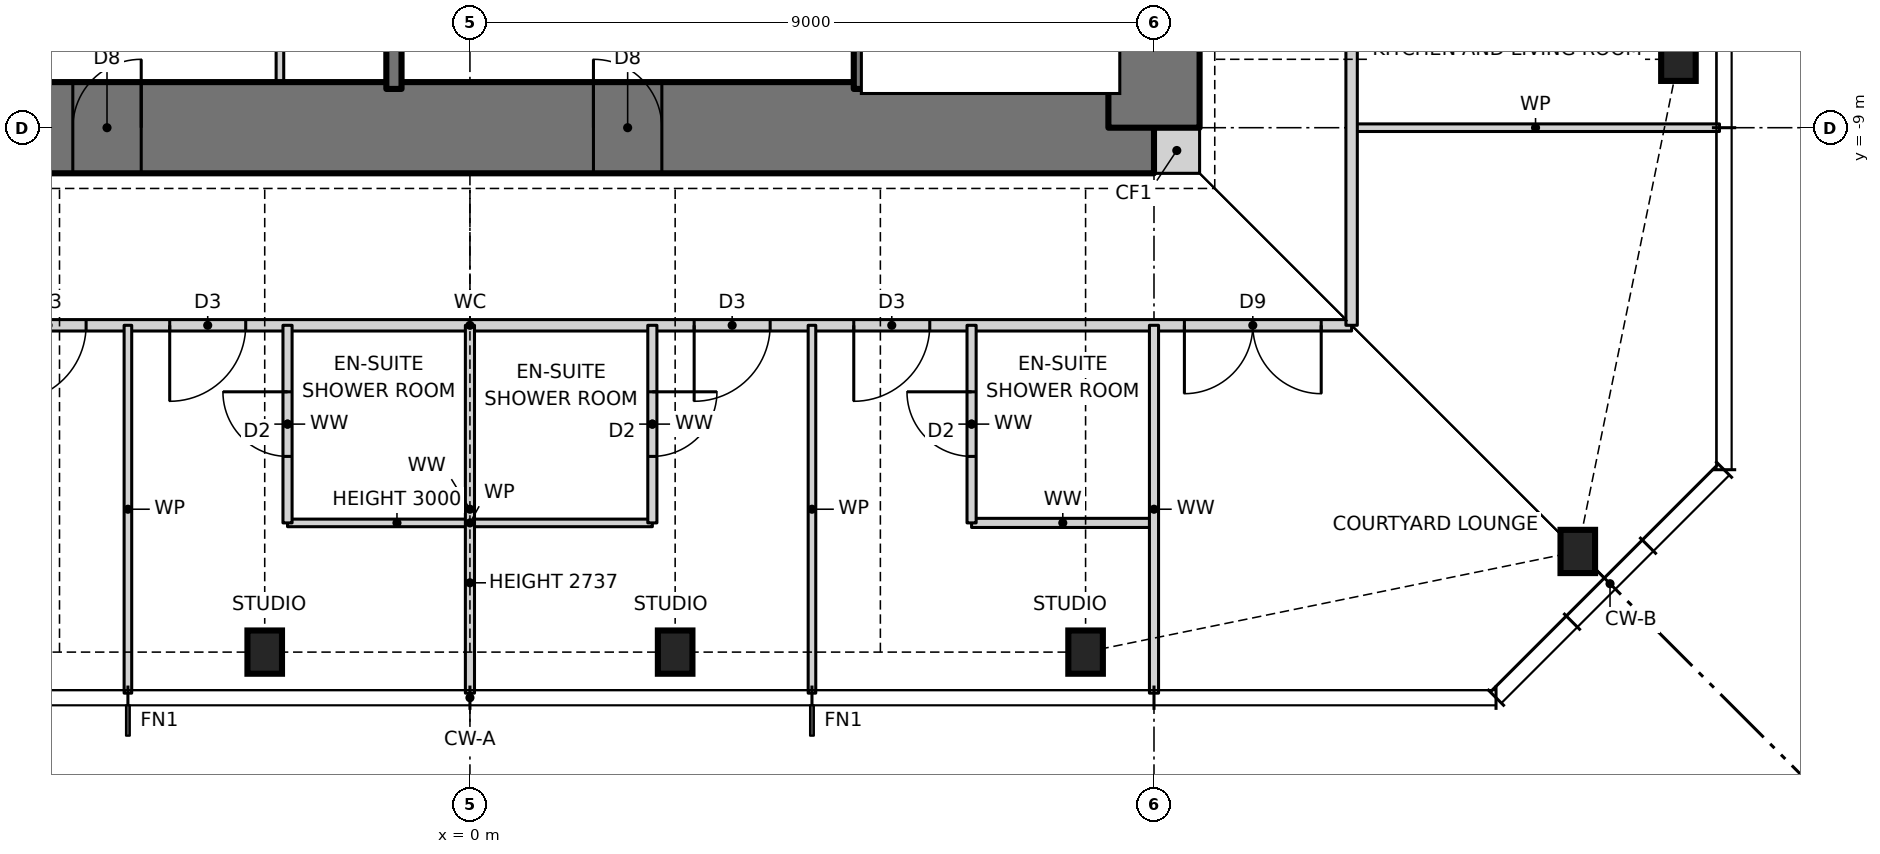
"""IFC4 building model, lengths in metres.
Left out: names, types, materials, properties, quantities, classifications, styles, units other than length and angle.
Written with IfcOpenShell. Run it as: python <this file> out.ifc"""

import sys

from ifc_helpers import new_model, si_unit, direction, frame, frame_2d, origin, origin_2d, place, context, subcontext, project, spatial, rectangle, i_section, extrude, element, fill, save


model = new_model("IFC4")
c1 = context("Model", 3, precision=1e-05, world=origin(), true_north=direction((0.0, 1.0)))
c2 = subcontext(c1, "Body", "Model", "MODEL_VIEW")
j1 = project(units=[si_unit("LENGTHUNIT", "METRE"), si_unit("PLANEANGLEUNIT", "RADIAN")], contexts=[c1])
p1 = place(None, origin())
s1 = spatial("IfcSite", under=j1, at=p1, CompositionType="ELEMENT")
p2 = place(p1, origin())
s2 = spatial("IfcBuilding", under=s1, at=p2, CompositionType="ELEMENT")
p3 = place(p2, frame((0.0, 0.0, 222.0)))
s3 = spatial("IfcBuildingStorey", under=s2, at=p3, CompositionType="ELEMENT", Elevation=222.0)
for number, where, z_axis, x_axis in (
    (1, (-2.7, -15.9, 0.0), (0.0, 0.0, 1.0), (1.0, 0.0, 0.0)),
    (2, (2.7, -15.9, 0.0), (0.0, 0.0, 1.0), (1.0, 0.0, 0.0)),
    (3, (8.1, -15.9, 0.0), (0.0, 0.0, 1.0), (1.0, 0.0, 0.0)),
    (4, (14.576, -14.576, 0.0), (0.0, 0.0, 1.0), (1.0, 0.0, 0.0)),
    (5, (15.9, -8.1, 0.0), (0.0, 0.0, 1.0), (1.0, 0.0, 0.0)),
):
    element("IfcColumn", number, at=place(p3, frame(where, z_axis=z_axis, x_axis=x_axis)), inside=s3, PredefinedType="COLUMN", context=c2, shape_type="SweptSolid", body=[
        extrude(i_section(OverallWidth=0.455, OverallDepth=0.569, WebThickness=0.078, FlangeThickness=0.125, at=origin_2d()), origin(), (0.0, 0.0, 1.0), 3.5),
    ])
p4 = place(p3, frame((9.0, -9.3, 0.0), z_axis=(0.0, 0.0, 1.0), x_axis=(1.0, 0.0, 0.0)))
e6 = element("IfcWall", 6, at=p4, inside=s3, PredefinedType="SOLIDWALL", context=c2, shape_type="SweptSolid", body=[
    extrude(rectangle(XDim=0.6, YDim=0.6, at=frame_2d((0.3, 0.0))), origin(), (0.0, 0.0, 1.0), 3.5),
])
p5 = place(p3, frame((-9.0, -9.0, 0.0), z_axis=(0.0, 0.0, 1.0), x_axis=(1.0, 0.0, 0.0)))
e7 = element("IfcWall", 7, at=p5, inside=s3, PredefinedType="SHEAR", context=c2, shape_type="SweptSolid", body=[
    extrude(rectangle(XDim=18.0, YDim=1.2, at=frame_2d((9.0, 0.0))), origin(), (0.0, 0.0, 1.0), 3.5),
])
p6 = place(p5, frame((3.775, 0.0, 0.0)))
e8 = element("IfcOpeningElement", 8, at=p6, cuts=e7, PredefinedType="OPENING", context=c2, shape_type="SweptSolid", body=[
    extrude(rectangle(XDim=0.9, YDim=2.1, at=frame_2d((0.45, 1.05))), frame((0.0, 0.61, 0.0), z_axis=(0.0, -1.0, 0.0), x_axis=(1.0, 0.0, 0.0)), (0.0, 0.0, 1.0), 1.22),
])
p7 = place(p5, frame((10.625, 0.0, 0.0)))
e9 = element("IfcOpeningElement", 9, at=p7, cuts=e7, PredefinedType="OPENING", context=c2, shape_type="SweptSolid", body=[
    extrude(rectangle(XDim=0.9, YDim=2.1, at=frame_2d((0.45, 1.05))), frame((0.0, 0.61, 0.0), z_axis=(0.0, -1.0, 0.0), x_axis=(1.0, 0.0, 0.0)), (0.0, 0.0, 1.0), 1.22),
])
p8 = place(p3, frame((9.0, -9.0, 0.0), z_axis=(0.0, 0.0, 1.0), x_axis=(0.0, 1.0, 0.0)))
e10 = element("IfcWall", 10, at=p8, inside=s3, PredefinedType="SHEAR", context=c2, shape_type="SweptSolid", body=[
    extrude(rectangle(XDim=18.0, YDim=1.2, at=frame_2d((9.0, 0.0))), origin(), (0.0, 0.0, 1.0), 3.5),
])
p9 = place(p8, frame((8.5, 0.0, 0.0)))
e11 = element("IfcOpeningElement", 11, at=p9, cuts=e10, PredefinedType="OPENING", context=c2, shape_type="SweptSolid", body=[
    extrude(rectangle(XDim=1.0, YDim=2.1, at=frame_2d((0.5, 1.05))), frame((0.0, 0.61, 0.0), z_axis=(0.0, -1.0, 0.0), x_axis=(1.0, 0.0, 0.0)), (0.0, 0.0, 1.0), 1.22),
])
p10 = place(p3, frame((-2.4, -14.2, 0.0), z_axis=(0.0, 0.0, 1.0), x_axis=(1.0, 0.0, 0.0)))
e12 = element("IfcWall", 12, at=p10, inside=s3, PredefinedType="PARTITIONING", context=c2, shape_type="SweptSolid", body=[
    extrude(rectangle(XDim=4.8, YDim=0.1, at=frame_2d((2.4, 0.0))), origin(), (0.0, 0.0, 1.0), 3.0),
])
p11 = place(p3, frame((6.6, -14.2, 0.0), z_axis=(0.0, 0.0, 1.0), x_axis=(1.0, 0.0, 0.0)))
e13 = element("IfcWall", 13, at=p11, inside=s3, PredefinedType="PARTITIONING", context=c2, shape_type="SweptSolid", body=[
    extrude(rectangle(XDim=2.4, YDim=0.12, at=frame_2d((1.2, 0.0))), origin(), (0.0, 0.0, 1.0), 3.27),
])
p12 = place(p3, frame((-11.6, -11.6, 0.0), z_axis=(0.0, 0.0, 1.0), x_axis=(1.0, 0.0, 0.0)))
e14 = element("IfcWall", 14, at=p12, inside=s3, PredefinedType="PARTITIONING", context=c2, shape_type="SweptSolid", body=[
    extrude(rectangle(XDim=23.2, YDim=0.15, at=frame_2d((11.6, 0.0))), origin(), (0.0, 0.0, 1.0), 3.27),
])
p13 = place(p12, frame((5.55, 0.0, 0.0)))
e15 = element("IfcOpeningElement", 15, at=p13, cuts=e14, PredefinedType="OPENING", context=c2, shape_type="SweptSolid", body=[
    extrude(rectangle(XDim=1.0, YDim=2.1, at=frame_2d((0.5, 1.05))), frame((0.0, 0.085, 0.0), z_axis=(0.0, -1.0, 0.0), x_axis=(1.0, 0.0, 0.0)), (0.0, 0.0, 1.0), 0.17),
])
p14 = place(p12, frame((7.65, 0.0, 0.0)))
e16 = element("IfcOpeningElement", 16, at=p14, cuts=e14, PredefinedType="OPENING", context=c2, shape_type="SweptSolid", body=[
    extrude(rectangle(XDim=1.0, YDim=2.1, at=frame_2d((0.5, 1.05))), frame((0.0, 0.085, 0.0), z_axis=(0.0, -1.0, 0.0), x_axis=(1.0, 0.0, 0.0)), (0.0, 0.0, 1.0), 0.17),
])
p15 = place(p12, frame((14.55, 0.0, 0.0)))
e17 = element("IfcOpeningElement", 17, at=p15, cuts=e14, PredefinedType="OPENING", context=c2, shape_type="SweptSolid", body=[
    extrude(rectangle(XDim=1.0, YDim=2.1, at=frame_2d((0.5, 1.05))), frame((0.0, 0.085, 0.0), z_axis=(0.0, -1.0, 0.0), x_axis=(1.0, 0.0, 0.0)), (0.0, 0.0, 1.0), 0.17),
])
p16 = place(p12, frame((16.65, 0.0, 0.0)))
e18 = element("IfcOpeningElement", 18, at=p16, cuts=e14, PredefinedType="OPENING", context=c2, shape_type="SweptSolid", body=[
    extrude(rectangle(XDim=1.0, YDim=2.1, at=frame_2d((0.5, 1.05))), frame((0.0, 0.085, 0.0), z_axis=(0.0, -1.0, 0.0), x_axis=(1.0, 0.0, 0.0)), (0.0, 0.0, 1.0), 0.17),
])
p17 = place(p12, frame((21.0, 0.0, 0.0)))
e19 = element("IfcOpeningElement", 19, at=p17, cuts=e14, PredefinedType="OPENING", context=c2, shape_type="SweptSolid", body=[
    extrude(rectangle(XDim=1.8, YDim=2.1, at=frame_2d((0.9, 1.05))), frame((0.0, 0.085, 0.0), z_axis=(0.0, -1.0, 0.0), x_axis=(1.0, 0.0, 0.0)), (0.0, 0.0, 1.0), 0.17),
])
p18 = place(p3, frame((11.6, -9.0, 0.0), z_axis=(0.0, 0.0, 1.0), x_axis=(1.0, 0.0, 0.0)))
e20 = element("IfcWall", 20, at=p18, inside=s3, PredefinedType="PARTITIONING", context=c2, shape_type="SweptSolid", body=[
    extrude(rectangle(XDim=4.84, YDim=0.1, at=frame_2d((2.42, 0.0))), origin(), (0.0, 0.0, 1.0), 3.27),
])
p19 = place(p3, frame((11.6, -11.6, 0.0), z_axis=(0.0, 0.0, 1.0), x_axis=(0.0, 1.0, 0.0)))
e21 = element("IfcWall", 21, at=p19, inside=s3, PredefinedType="PARTITIONING", context=c2, shape_type="SweptSolid", body=[
    extrude(rectangle(XDim=23.2, YDim=0.15, at=frame_2d((11.6, 0.0))), origin(), (0.0, 0.0, 1.0), 3.27),
])
p20 = place(p19, frame((5.7, 0.0, 0.0)))
e22 = element("IfcOpeningElement", 22, at=p20, cuts=e21, PredefinedType="OPENING", context=c2, shape_type="SweptSolid", body=[
    extrude(rectangle(XDim=1.0, YDim=2.1, at=frame_2d((0.5, 1.05))), frame((0.0, 0.085, 0.0), z_axis=(0.0, -1.0, 0.0), x_axis=(1.0, 0.0, 0.0)), (0.0, 0.0, 1.0), 0.17),
])
p21 = place(p19, frame((12.15, 0.0, 0.0)))
e23 = element("IfcOpeningElement", 23, at=p21, cuts=e21, PredefinedType="OPENING", context=c2, shape_type="SweptSolid", body=[
    extrude(rectangle(XDim=1.0, YDim=2.1, at=frame_2d((0.5, 1.05))), frame((0.0, 0.085, 0.0), z_axis=(0.0, -1.0, 0.0), x_axis=(1.0, 0.0, 0.0)), (0.0, 0.0, 1.0), 0.17),
])
p22 = place(p19, frame((19.05, 0.0, 0.0)))
e24 = element("IfcOpeningElement", 24, at=p22, cuts=e21, PredefinedType="OPENING", context=c2, shape_type="SweptSolid", body=[
    extrude(rectangle(XDim=1.0, YDim=2.1, at=frame_2d((0.5, 1.05))), frame((0.0, 0.085, 0.0), z_axis=(0.0, -1.0, 0.0), x_axis=(1.0, 0.0, 0.0)), (0.0, 0.0, 1.0), 0.17),
])
p23 = place(p19, frame((21.0, 0.0, 0.0)))
e25 = element("IfcOpeningElement", 25, at=p23, cuts=e21, PredefinedType="OPENING", context=c2, shape_type="SweptSolid", body=[
    extrude(rectangle(XDim=1.8, YDim=2.1, at=frame_2d((0.9, 1.05))), frame((0.0, 0.085, 0.0), z_axis=(0.0, -1.0, 0.0), x_axis=(1.0, 0.0, 0.0)), (0.0, 0.0, 1.0), 0.17),
])
p24 = place(p3, frame((9.0, -16.44, 0.0), z_axis=(0.0, 0.0, 1.0), x_axis=(0.0, 1.0, 0.0)))
e26 = element("IfcWall", 26, at=p24, inside=s3, PredefinedType="PARTITIONING", context=c2, shape_type="SweptSolid", body=[
    extrude(rectangle(XDim=4.84, YDim=0.12, at=frame_2d((2.42, 0.0))), origin(), (0.0, 0.0, 1.0), 3.27),
])
p25 = place(p3, frame((6.6, -14.2, 0.0), z_axis=(0.0, 0.0, 1.0), x_axis=(0.0, 1.0, 0.0)))
e27 = element("IfcWall", 27, at=p25, inside=s3, PredefinedType="PARTITIONING", context=c2, shape_type="SweptSolid", body=[
    extrude(rectangle(XDim=2.6, YDim=0.12, at=frame_2d((1.3, 0.0))), origin(), (0.0, 0.0, 1.0), 3.27),
])
p26 = place(p25, frame((0.875, 0.0, 0.0)))
e28 = element("IfcOpeningElement", 28, at=p26, cuts=e27, PredefinedType="OPENING", context=c2, shape_type="SweptSolid", body=[
    extrude(rectangle(XDim=0.85, YDim=2.1, at=frame_2d((0.425, 1.05))), frame((0.0, 0.07, 0.0), z_axis=(0.0, -1.0, 0.0), x_axis=(1.0, 0.0, 0.0)), (0.0, 0.0, 1.0), 0.14),
])
p27 = place(p3, frame((5.15, -8.49, 0.0), z_axis=(0.0, 0.0, 1.0), x_axis=(0.0, 1.0, 0.0)))
e29 = element("IfcWall", 29, at=p27, inside=s3, PredefinedType="SOLIDWALL", context=c2, shape_type="SweptSolid", body=[
    extrude(rectangle(XDim=13.09, YDim=0.2, at=frame_2d((6.545, 0.0))), origin(), (0.0, 0.0, 1.0), 3.5),
])
p28 = place(p27, frame((7.89, 0.0, 0.0)))
e30 = element("IfcOpeningElement", 30, at=p28, cuts=e29, PredefinedType="OPENING", context=c2, shape_type="SweptSolid", body=[
    extrude(rectangle(XDim=1.2, YDim=2.1, at=frame_2d((0.6, 1.05))), frame((0.0, 0.11, 0.0), z_axis=(0.0, -1.0, 0.0), x_axis=(1.0, 0.0, 0.0)), (0.0, 0.0, 1.0), 0.22),
])
p29 = place(p3, frame((4.5, -16.44, 0.0), z_axis=(0.0, 0.0, 1.0), x_axis=(0.0, 1.0, 0.0)))
e31 = element("IfcWall", 31, at=p29, inside=s3, PredefinedType="PARTITIONING", context=c2, shape_type="SweptSolid", body=[
    extrude(rectangle(XDim=4.84, YDim=0.1, at=frame_2d((2.42, 0.0))), origin(), (0.0, 0.0, 1.0), 3.27),
])
p30 = place(p3, frame((2.4, -14.2, 0.0), z_axis=(0.0, 0.0, 1.0), x_axis=(0.0, 1.0, 0.0)))
e32 = element("IfcWall", 32, at=p30, inside=s3, PredefinedType="PARTITIONING", context=c2, shape_type="SweptSolid", body=[
    extrude(rectangle(XDim=2.6, YDim=0.12, at=frame_2d((1.3, 0.0))), origin(), (0.0, 0.0, 1.0), 3.27),
])
p31 = place(p30, frame((0.875, 0.0, 0.0)))
e33 = element("IfcOpeningElement", 33, at=p31, cuts=e32, PredefinedType="OPENING", context=c2, shape_type="SweptSolid", body=[
    extrude(rectangle(XDim=0.85, YDim=2.1, at=frame_2d((0.425, 1.05))), frame((0.0, 0.07, 0.0), z_axis=(0.0, -1.0, 0.0), x_axis=(1.0, 0.0, 0.0)), (0.0, 0.0, 1.0), 0.14),
])
p32 = place(p3, frame((0.0, -16.44, 0.0), z_axis=(0.0, 0.0, 1.0), x_axis=(0.0, 1.0, 0.0)))
e34 = element("IfcWall", 34, at=p32, inside=s3, PredefinedType="PARTITIONING", context=c2, shape_type="SweptSolid", body=[
    extrude(rectangle(XDim=4.84, YDim=0.12, at=frame_2d((2.42, 0.0))), origin(), (0.0, 0.0, 1.0), 2.737),
])
p33 = place(p3, frame((-1.0, -8.49, 0.0), z_axis=(0.0, 0.0, 1.0), x_axis=(0.0, 1.0, 0.0)))
e35 = element("IfcWall", 35, at=p33, inside=s3, PredefinedType="SOLIDWALL", context=c2, shape_type="SweptSolid", body=[
    extrude(rectangle(XDim=4.09, YDim=0.2, at=frame_2d((2.045, 0.0))), origin(), (0.0, 0.0, 1.0), 3.5),
])
p34 = place(p3, frame((-2.4, -14.2, 0.0), z_axis=(0.0, 0.0, 1.0), x_axis=(0.0, 1.0, 0.0)))
e36 = element("IfcWall", 36, at=p34, inside=s3, PredefinedType="PARTITIONING", context=c2, shape_type="SweptSolid", body=[
    extrude(rectangle(XDim=2.6, YDim=0.12, at=frame_2d((1.3, 0.0))), origin(), (0.0, 0.0, 1.0), 3.27),
])
p35 = place(p34, frame((0.875, 0.0, 0.0)))
e37 = element("IfcOpeningElement", 37, at=p35, cuts=e36, PredefinedType="OPENING", context=c2, shape_type="SweptSolid", body=[
    extrude(rectangle(XDim=0.85, YDim=2.1, at=frame_2d((0.425, 1.05))), frame((0.0, 0.07, 0.0), z_axis=(0.0, -1.0, 0.0), x_axis=(1.0, 0.0, 0.0)), (0.0, 0.0, 1.0), 0.14),
])
p36 = place(p3, frame((-2.5, -8.49, 0.0), z_axis=(0.0, 0.0, 1.0), x_axis=(0.0, 1.0, 0.0)))
e38 = element("IfcWall", 38, at=p36, inside=s3, PredefinedType="PARTITIONING", context=c2, shape_type="SweptSolid", body=[
    extrude(rectangle(XDim=4.09, YDim=0.1, at=frame_2d((2.045, 0.0))), origin(), (0.0, 0.0, 1.0), 3.3),
])
p37 = place(p36, frame((1.595, 0.0, 0.0)))
e39 = element("IfcOpeningElement", 39, at=p37, cuts=e38, PredefinedType="OPENING", context=c2, shape_type="SweptSolid", body=[
    extrude(rectangle(XDim=0.9, YDim=2.1, at=frame_2d((0.45, 1.05))), frame((0.0, 0.06, 0.0), z_axis=(0.0, -1.0, 0.0), x_axis=(1.0, 0.0, 0.0)), (0.0, 0.0, 1.0), 0.12),
])
p38 = place(p3, frame((-4.5, -16.44, 0.0), z_axis=(0.0, 0.0, 1.0), x_axis=(0.0, 1.0, 0.0)))
e40 = element("IfcWall", 40, at=p38, inside=s3, PredefinedType="PARTITIONING", context=c2, shape_type="SweptSolid", body=[
    extrude(rectangle(XDim=4.84, YDim=0.1, at=frame_2d((2.42, 0.0))), origin(), (0.0, 0.0, 1.0), 3.27),
])
p39 = place(p13, frame((1.0, 0.0, 0.0), z_axis=(0.0, 0.0, 1.0), x_axis=(-1.0, 0.0, 0.0)))
e41 = element("IfcDoor", 41, at=p39, inside=s3, OperationType="SINGLE_SWING_RIGHT", PredefinedType="DOOR", context=c2, shape_type="SweptSolid", body=[
    extrude(rectangle(XDim=1.0, YDim=2.1, at=frame_2d((0.5, 1.05))), frame((0.0, 0.025, 0.0), z_axis=(0.0, -1.0, 0.0), x_axis=(1.0, 0.0, 0.0)), (0.0, 0.0, 1.0), 0.05),
])
fill(e15, e41)
p40 = place(p14, frame((1.0, 0.0, 0.0), z_axis=(0.0, 0.0, 1.0), x_axis=(-1.0, 0.0, 0.0)))
e42 = element("IfcDoor", 42, at=p40, inside=s3, OperationType="SINGLE_SWING_RIGHT", PredefinedType="DOOR", context=c2, shape_type="SweptSolid", body=[
    extrude(rectangle(XDim=1.0, YDim=2.1, at=frame_2d((0.5, 1.05))), frame((0.0, 0.025, 0.0), z_axis=(0.0, -1.0, 0.0), x_axis=(1.0, 0.0, 0.0)), (0.0, 0.0, 1.0), 0.05),
])
fill(e16, e42)
p41 = place(p35, origin())
e43 = element("IfcDoor", 43, at=p41, inside=s3, OperationType="SINGLE_SWING_RIGHT", PredefinedType="DOOR", context=c2, shape_type="SweptSolid", body=[
    extrude(rectangle(XDim=0.85, YDim=2.1, at=frame_2d((0.425, 1.05))), frame((0.0, 0.025, 0.0), z_axis=(0.0, -1.0, 0.0), x_axis=(1.0, 0.0, 0.0)), (0.0, 0.0, 1.0), 0.05),
])
fill(e37, e43)
p42 = place(p15, frame((1.0, 0.0, 0.0), z_axis=(0.0, 0.0, 1.0), x_axis=(-1.0, 0.0, 0.0)))
e44 = element("IfcDoor", 44, at=p42, inside=s3, OperationType="SINGLE_SWING_RIGHT", PredefinedType="DOOR", context=c2, shape_type="SweptSolid", body=[
    extrude(rectangle(XDim=1.0, YDim=2.1, at=frame_2d((0.5, 1.05))), frame((0.0, 0.025, 0.0), z_axis=(0.0, -1.0, 0.0), x_axis=(1.0, 0.0, 0.0)), (0.0, 0.0, 1.0), 0.05),
])
fill(e17, e44)
p43 = place(p31, frame((0.85, 0.0, 0.0), z_axis=(0.0, 0.0, 1.0), x_axis=(-1.0, 0.0, 0.0)))
e45 = element("IfcDoor", 45, at=p43, inside=s3, OperationType="SINGLE_SWING_LEFT", PredefinedType="DOOR", context=c2, shape_type="SweptSolid", body=[
    extrude(rectangle(XDim=0.85, YDim=2.1, at=frame_2d((0.425, 1.05))), frame((0.0, 0.025, 0.0), z_axis=(0.0, -1.0, 0.0), x_axis=(1.0, 0.0, 0.0)), (0.0, 0.0, 1.0), 0.05),
])
fill(e33, e45)
p44 = place(p16, frame((1.0, 0.0, 0.0), z_axis=(0.0, 0.0, 1.0), x_axis=(-1.0, 0.0, 0.0)))
e46 = element("IfcDoor", 46, at=p44, inside=s3, OperationType="SINGLE_SWING_RIGHT", PredefinedType="DOOR", context=c2, shape_type="SweptSolid", body=[
    extrude(rectangle(XDim=1.0, YDim=2.1, at=frame_2d((0.5, 1.05))), frame((0.0, 0.025, 0.0), z_axis=(0.0, -1.0, 0.0), x_axis=(1.0, 0.0, 0.0)), (0.0, 0.0, 1.0), 0.05),
])
fill(e18, e46)
p45 = place(p26, origin())
e47 = element("IfcDoor", 47, at=p45, inside=s3, OperationType="SINGLE_SWING_RIGHT", PredefinedType="DOOR", context=c2, shape_type="SweptSolid", body=[
    extrude(rectangle(XDim=0.85, YDim=2.1, at=frame_2d((0.425, 1.05))), frame((0.0, 0.025, 0.0), z_axis=(0.0, -1.0, 0.0), x_axis=(1.0, 0.0, 0.0)), (0.0, 0.0, 1.0), 0.05),
])
fill(e28, e47)
p46 = place(p17, frame((1.8, 0.0, 0.0), z_axis=(0.0, 0.0, 1.0), x_axis=(-1.0, 0.0, 0.0)))
e48 = element("IfcDoor", 48, at=p46, inside=s3, OperationType="DOUBLE_DOOR_SINGLE_SWING", PredefinedType="DOOR", context=c2, shape_type="SweptSolid", body=[
    extrude(rectangle(XDim=1.8, YDim=2.1, at=frame_2d((0.9, 1.05))), frame((0.0, 0.025, 0.0), z_axis=(0.0, -1.0, 0.0), x_axis=(1.0, 0.0, 0.0)), (0.0, 0.0, 1.0), 0.05),
])
fill(e19, e48)
p47 = place(p6, origin())
e49 = element("IfcDoor", 49, at=p47, inside=s3, OperationType="SINGLE_SWING_RIGHT", PredefinedType="DOOR", context=c2, shape_type="SweptSolid", body=[
    extrude(rectangle(XDim=0.9, YDim=2.1, at=frame_2d((0.45, 1.05))), frame((0.0, 0.025, 0.0), z_axis=(0.0, -1.0, 0.0), x_axis=(1.0, 0.0, 0.0)), (0.0, 0.0, 1.0), 0.05),
])
fill(e8, e49)
p48 = place(p7, origin())
e50 = element("IfcDoor", 50, at=p48, inside=s3, OperationType="SINGLE_SWING_LEFT", PredefinedType="DOOR", context=c2, shape_type="SweptSolid", body=[
    extrude(rectangle(XDim=0.9, YDim=2.1, at=frame_2d((0.45, 1.05))), frame((0.0, 0.025, 0.0), z_axis=(0.0, -1.0, 0.0), x_axis=(1.0, 0.0, 0.0)), (0.0, 0.0, 1.0), 0.05),
])
fill(e9, e50)
save(model, sys.argv[1])
